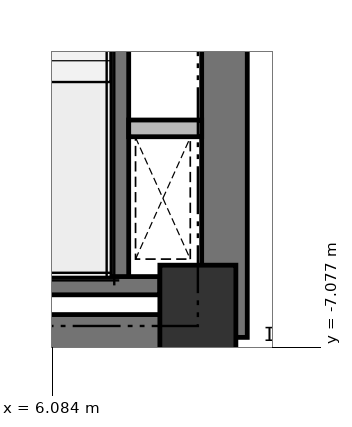
"""IFC4 building model, lengths in metres.
Left out: names, types, materials, properties, quantities, classifications, styles, units other than length and angle.
Written with IfcOpenShell. Run it as: python <this file> out.ifc"""

import sys

from ifc_helpers import new_model, si_unit, direction, frame, frame_2d, origin, origin_2d, place, context, subcontext, project, spatial, rectangle, extrude, element, save


model = new_model("IFC4")
c1 = context("Model", 3, precision=1e-05, world=origin(), true_north=direction((0.0, 1.0)))
c2 = subcontext(c1, "Body", "Model", "MODEL_VIEW")
j1 = project(units=[si_unit("LENGTHUNIT", "METRE"), si_unit("PLANEANGLEUNIT", "RADIAN")], contexts=[c1])
p1 = place(None, origin())
s1 = spatial("IfcSite", under=j1, at=p1, CompositionType="ELEMENT")
p2 = place(p1, origin())
s2 = spatial("IfcBuilding", under=s1, at=p2, CompositionType="ELEMENT")
p3 = place(p2, frame((0.0, 0.0, 88.25)))
s3 = spatial("IfcBuildingStorey", under=s2, at=p3, CompositionType="ELEMENT", Elevation=88.25)
p4 = place(p3, frame((8.0, -6.6, 0.0), z_axis=(0.0, 0.0, 1.0), x_axis=(1.0, 0.0, 0.0)))
e1 = element("IfcColumn", 1, at=p4, inside=s3, PredefinedType="COLUMN", context=c2, shape_type="SweptSolid", body=[
    extrude(rectangle(XDim=1.0, YDim=1.2, at=origin_2d()), origin(), (0.0, 0.0, 1.0), 4.5),
])
p5 = place(p3, frame((4.4, -6.95, 0.0), z_axis=(0.0, 0.0, 1.0), x_axis=(1.0, 0.0, 0.0)))
e2 = element("IfcWall", 2, at=p5, inside=s3, PredefinedType="SHEAR", context=c2, shape_type="SweptSolid", body=[
    extrude(rectangle(XDim=3.95, YDim=0.6, at=frame_2d((1.975, 0.0))), origin(), (0.0, 0.0, 1.0), 4.21),
])
p6 = place(p3, frame((8.35, -6.95, 0.0), z_axis=(0.0, 0.0, 1.0), x_axis=(0.0, 1.0, 0.0)))
e3 = element("IfcWall", 3, at=p6, inside=s3, PredefinedType="SHEAR", context=c2, shape_type="SweptSolid", body=[
    extrude(rectangle(XDim=8.1, YDim=0.6, at=frame_2d((4.05, 0.0))), origin(), (0.0, 0.0, 1.0), 4.21),
])
p7 = place(p3, frame((6.97, -6.16, 0.0), z_axis=(0.0, 0.0, 1.0), x_axis=(0.0, 1.0, 0.0)))
e4 = element("IfcWall", 4, at=p7, inside=s3, PredefinedType="SHEAR", context=c2, shape_type="SweptSolid", body=[
    extrude(rectangle(XDim=7.22, YDim=0.24, at=frame_2d((3.61, 0.0))), origin(), (0.0, 0.0, 1.0), 4.21),
])
p8 = place(p3, frame((4.01, -6.27, 0.0), z_axis=(0.0, 0.0, 1.0), x_axis=(1.0, 0.0, 0.0)))
e5 = element("IfcWall", 5, at=p8, inside=s3, PredefinedType="SHEAR", context=c2, shape_type="SweptSolid", body=[
    extrude(rectangle(XDim=3.49, YDim=0.24, at=frame_2d((1.745, 0.0))), origin(), (0.0, 0.0, 1.0), 4.21),
])
p9 = place(p3, frame((7.09, -4.2, 0.0), z_axis=(0.0, 0.0, 1.0), x_axis=(1.0, 0.0, 0.0)))
e6 = element("IfcWall", 6, at=p9, inside=s3, PredefinedType="PARTITIONING", context=c2, shape_type="SweptSolid", body=[
    extrude(rectangle(XDim=0.96, YDim=0.22, at=frame_2d((0.48, 0.0))), origin(), (0.0, 0.0, 1.0), 4.21),
])
save(model, sys.argv[1])
